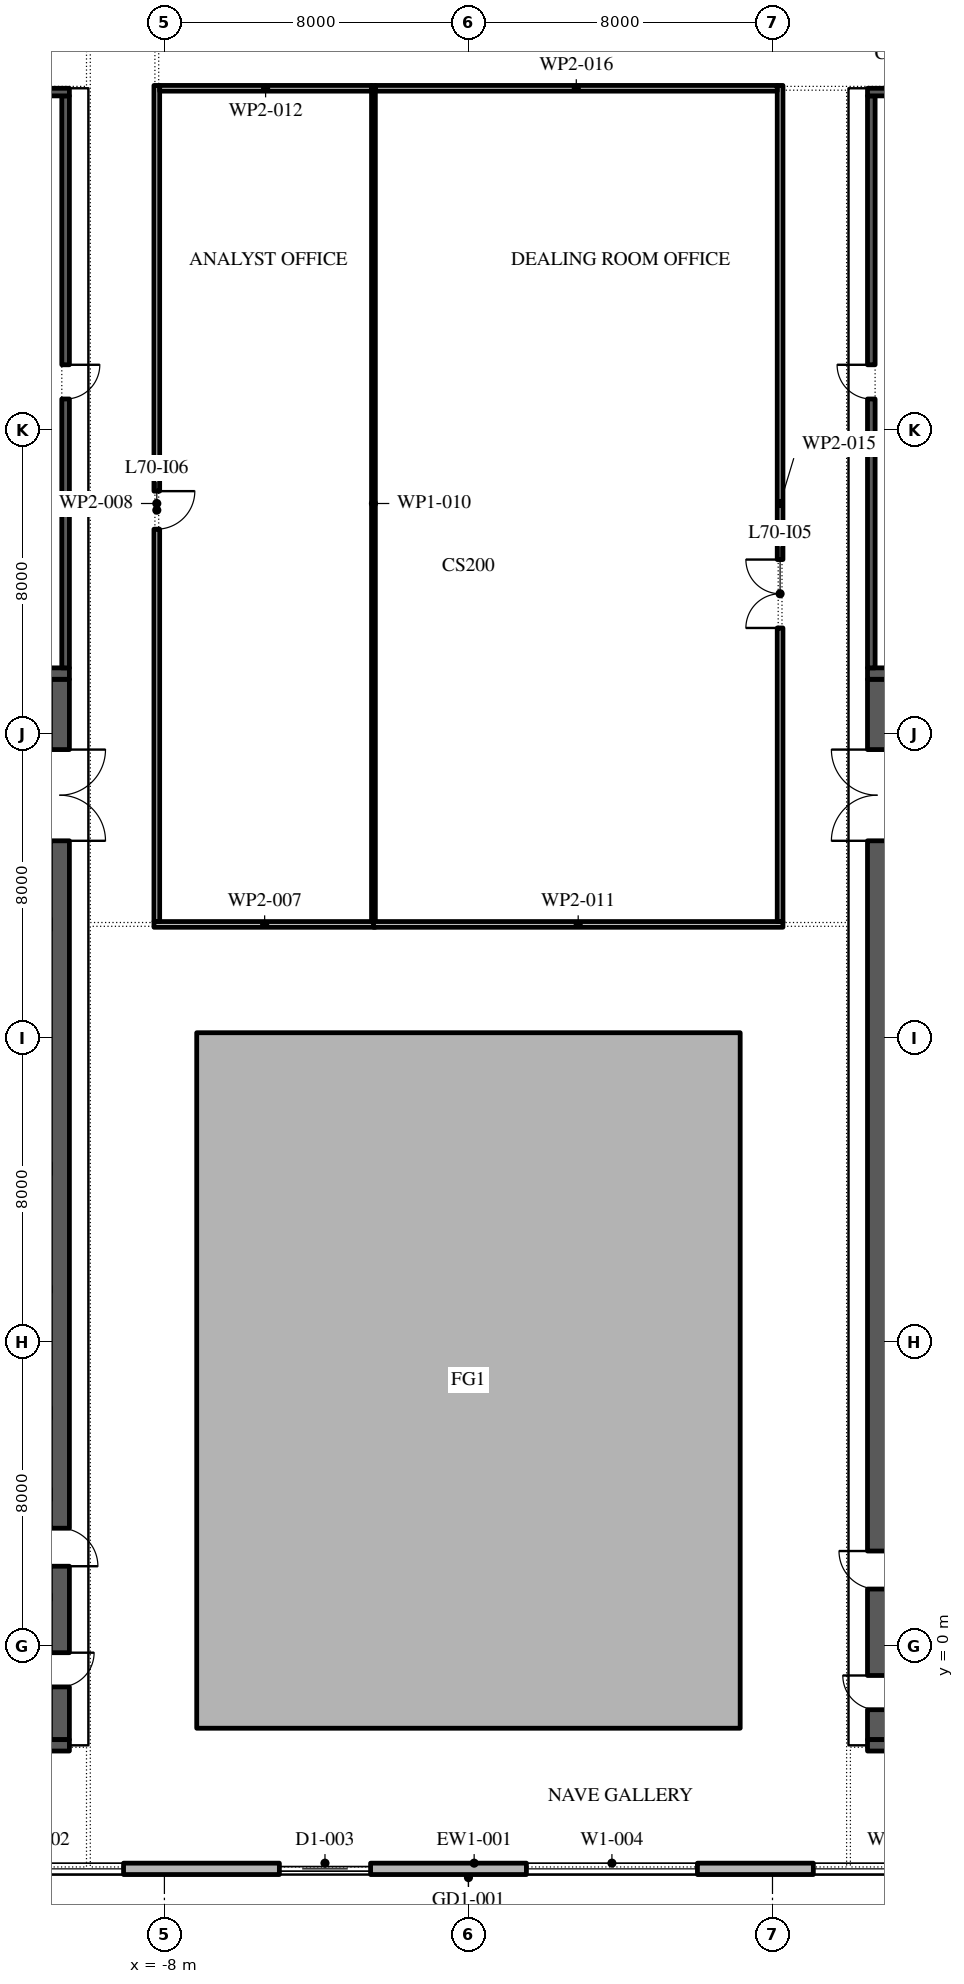
"""IFC4 building model, lengths in metres.
Left out: names, types, materials, properties, quantities, classifications, styles, units other than length and angle.
Written with IfcOpenShell. Run it as: python <this file> out.ifc"""

import sys

from ifc_helpers import new_model, si_unit, direction, frame, frame_2d, origin, place, context, subcontext, project, spatial, polyline, rectangle, outline, extrude, element, fill, save


model = new_model("IFC4")
c1 = context("Model", 3, precision=1e-05, world=origin(), true_north=direction((0.0, 1.0)))
c2 = subcontext(c1, "Body", "Model", "MODEL_VIEW")
j1 = project(units=[si_unit("LENGTHUNIT", "METRE"), si_unit("PLANEANGLEUNIT", "RADIAN")], contexts=[c1])
p1 = place(None, origin())
s1 = spatial("IfcSite", under=j1, at=p1, CompositionType="ELEMENT")
p2 = place(p1, origin())
s2 = spatial("IfcBuilding", under=s1, at=p2, CompositionType="ELEMENT")
p3 = place(p2, frame((0.0, 0.0, 321.6)))
s3 = spatial("IfcBuildingStorey", under=s2, at=p3, CompositionType="ELEMENT", Elevation=321.6)
p4 = place(p3, origin())
e1 = element("IfcWall", 1, at=p4, inside=s3, PredefinedType="STANDARD", context=c2, shape_type="SweptSolid", body=[
    extrude(outline(polyline([(-7.15, -2.15), (7.15, -2.15), (7.15, 16.15), (-7.15, 16.15), (-7.15, -2.15)]), holes=[polyline([(-7.0, -2.0), (-7.0, 16.0), (7.0, 16.0), (7.0, -2.0), (-7.0, -2.0)])]), origin(), (0.0, 0.0, 1.0), 4.0),
])
p5 = place(p3, frame((-22.35, -5.85, 0.0), z_axis=(0.0, 0.0, 1.0), x_axis=(1.0, 0.0, 0.0)))
e2 = element("IfcWall", 2, at=p5, inside=s3, PredefinedType="STANDARD", context=c2, shape_type="SweptSolid", body=[
    extrude(rectangle(XDim=45.0, YDim=0.3, at=frame_2d((22.5, 0.0))), origin(), (0.0, 0.0, 1.0), 4.0),
])
p6 = place(p5, frame((1.375, 0.0, 0.45)))
e3 = element("IfcOpeningElement", 3, at=p6, cuts=e2, PredefinedType="OPENING", context=c2, shape_type="SweptSolid", body=[
    extrude(rectangle(XDim=4.5, YDim=3.05, at=frame_2d((2.25, 1.525))), frame((0.0, 0.16, 0.0), z_axis=(0.0, -1.0, 0.0), x_axis=(1.0, 0.0, 0.0)), (0.0, 0.0, 1.0), 0.32),
])
p7 = place(p5, frame((8.775, 0.0, 0.45)))
e4 = element("IfcOpeningElement", 4, at=p7, cuts=e2, PredefinedType="OPENING", context=c2, shape_type="SweptSolid", body=[
    extrude(rectangle(XDim=4.5, YDim=3.05, at=frame_2d((2.25, 1.525))), frame((0.0, 0.16, 0.0), z_axis=(0.0, -1.0, 0.0), x_axis=(1.0, 0.0, 0.0)), (0.0, 0.0, 1.0), 0.32),
])
p8 = place(p5, frame((17.375, 0.0, 0.0)))
e5 = element("IfcOpeningElement", 5, at=p8, cuts=e2, PredefinedType="OPENING", context=c2, shape_type="SweptSolid", body=[
    extrude(rectangle(XDim=2.4, YDim=3.5, at=frame_2d((1.2, 1.75))), frame((0.0, 0.16, 0.0), z_axis=(0.0, -1.0, 0.0), x_axis=(1.0, 0.0, 0.0)), (0.0, 0.0, 1.0), 0.32),
])
p9 = place(p5, frame((23.875, 0.0, 0.45)))
e6 = element("IfcOpeningElement", 6, at=p9, cuts=e2, PredefinedType="OPENING", context=c2, shape_type="SweptSolid", body=[
    extrude(rectangle(XDim=4.5, YDim=3.05, at=frame_2d((2.25, 1.525))), frame((0.0, 0.16, 0.0), z_axis=(0.0, -1.0, 0.0), x_axis=(1.0, 0.0, 0.0)), (0.0, 0.0, 1.0), 0.32),
])
p10 = place(p5, frame((31.425, 0.0, 0.45)))
e7 = element("IfcOpeningElement", 7, at=p10, cuts=e2, PredefinedType="OPENING", context=c2, shape_type="SweptSolid", body=[
    extrude(rectangle(XDim=4.5, YDim=3.05, at=frame_2d((2.25, 1.525))), frame((0.0, 0.16, 0.0), z_axis=(0.0, -1.0, 0.0), x_axis=(1.0, 0.0, 0.0)), (0.0, 0.0, 1.0), 0.32),
])
p11 = place(p5, frame((38.975, 0.0, 0.45)))
e8 = element("IfcOpeningElement", 8, at=p11, cuts=e2, PredefinedType="OPENING", context=c2, shape_type="SweptSolid", body=[
    extrude(rectangle(XDim=4.5, YDim=3.05, at=frame_2d((2.25, 1.525))), frame((0.0, 0.16, 0.0), z_axis=(0.0, -1.0, 0.0), x_axis=(1.0, 0.0, 0.0)), (0.0, 0.0, 1.0), 0.32),
])
p12 = place(p3, frame((-10.75, -2.45, 0.0), z_axis=(0.0, 0.0, 1.0), x_axis=(0.0, 1.0, 0.0)))
e9 = element("IfcWall", 9, at=p12, inside=s3, PredefinedType="SHEAR", context=c2, shape_type="SweptSolid", body=[
    extrude(rectangle(XDim=27.9, YDim=0.5, at=frame_2d((13.95, 0.0))), origin(), (0.0, 0.0, 1.0), 4.0),
])
p13 = place(p12, frame((23.65, 0.0, 0.0)))
e10 = element("IfcOpeningElement", 10, at=p13, cuts=e9, PredefinedType="OPENING", context=c2, shape_type="SweptSolid", body=[
    extrude(rectangle(XDim=2.4, YDim=2.1, at=frame_2d((1.2, 1.05))), frame((0.0, 0.26, 0.0), z_axis=(0.0, -1.0, 0.0), x_axis=(1.0, 0.0, 0.0)), (0.0, 0.0, 1.0), 0.52),
])
p14 = place(p12, frame((1.387, 0.0, 0.0)))
e11 = element("IfcOpeningElement", 11, at=p14, cuts=e9, PredefinedType="OPENING", context=c2, shape_type="SweptSolid", body=[
    extrude(rectangle(XDim=0.9, YDim=2.1, at=frame_2d((0.45, 1.05))), frame((0.0, 0.26, 0.0), z_axis=(0.0, -1.0, 0.0), x_axis=(1.0, 0.0, 0.0)), (0.0, 0.0, 1.0), 0.52),
])
p15 = place(p12, frame((4.562, 0.0, 0.0)))
e12 = element("IfcOpeningElement", 12, at=p15, cuts=e9, PredefinedType="OPENING", context=c2, shape_type="SweptSolid", body=[
    extrude(rectangle(XDim=1.0, YDim=2.1, at=frame_2d((0.5, 1.05))), frame((0.0, 0.26, 0.0), z_axis=(0.0, -1.0, 0.0), x_axis=(1.0, 0.0, 0.0)), (0.0, 0.0, 1.0), 0.52),
])
for number, where, z_axis, x_axis in (
    (13, (-21.5, -2.6, 0.0), (0.0, 0.0, 1.0), (1.0, 0.0, 0.0)),
    (14, (-21.5, 25.6, 0.0), (0.0, 0.0, 1.0), (1.0, 0.0, 0.0)),
):
    element("IfcWall", number, at=place(p3, frame(where, z_axis=z_axis, x_axis=x_axis)), inside=s3, PredefinedType="SHEAR", context=c2, shape_type="SweptSolid", body=[
        extrude(rectangle(XDim=11.0, YDim=0.3, at=frame_2d((5.5, 0.0))), origin(), (0.0, 0.0, 1.0), 4.0),
    ])
p16 = place(p3, frame((-10.6, 25.75, 0.0), z_axis=(0.0, 0.0, 1.0), x_axis=(0.0, 1.0, 0.0)))
e15 = element("IfcWall", 15, at=p16, inside=s3, PredefinedType="SHEAR", context=c2, shape_type="SweptSolid", body=[
    extrude(rectangle(XDim=15.05, YDim=0.2, at=frame_2d((7.525, 0.0))), origin(), (0.0, 0.0, 1.0), 4.0),
])
p17 = place(p16, frame((7.075, 0.0, 0.0)))
e16 = element("IfcOpeningElement", 16, at=p17, cuts=e15, PredefinedType="OPENING", context=c2, shape_type="SweptSolid", body=[
    extrude(rectangle(XDim=0.9, YDim=2.1, at=frame_2d((0.45, 1.05))), frame((0.0, 0.11, 0.0), z_axis=(0.0, -1.0, 0.0), x_axis=(1.0, 0.0, 0.0)), (0.0, 0.0, 1.0), 0.22),
])
p18 = place(p3, frame((-21.5, 40.9, 0.0), z_axis=(0.0, 0.0, 1.0), x_axis=(1.0, 0.0, 0.0)))
e17 = element("IfcWall", 17, at=p18, inside=s3, PredefinedType="SHEAR", context=c2, shape_type="SweptSolid", body=[
    extrude(rectangle(XDim=11.0, YDim=0.2, at=frame_2d((5.5, 0.0))), origin(), (0.0, 0.0, 1.0), 4.0),
])
p19 = place(p3, frame((10.75, -2.45, 0.0), z_axis=(0.0, 0.0, 1.0), x_axis=(0.0, 1.0, 0.0)))
e18 = element("IfcWall", 18, at=p19, inside=s3, PredefinedType="SHEAR", context=c2, shape_type="SweptSolid", body=[
    extrude(rectangle(XDim=27.9, YDim=0.5, at=frame_2d((13.95, 0.0))), origin(), (0.0, 0.0, 1.0), 4.0),
])
p20 = place(p19, frame((23.65, 0.0, 0.0)))
e19 = element("IfcOpeningElement", 19, at=p20, cuts=e18, PredefinedType="OPENING", context=c2, shape_type="SweptSolid", body=[
    extrude(rectangle(XDim=2.4, YDim=2.1, at=frame_2d((1.2, 1.05))), frame((0.0, 0.26, 0.0), z_axis=(0.0, -1.0, 0.0), x_axis=(1.0, 0.0, 0.0)), (0.0, 0.0, 1.0), 0.52),
])
p21 = place(p19, frame((0.788, 0.0, 0.0)))
e20 = element("IfcOpeningElement", 20, at=p21, cuts=e18, PredefinedType="OPENING", context=c2, shape_type="SweptSolid", body=[
    extrude(rectangle(XDim=0.9, YDim=2.1, at=frame_2d((0.45, 1.05))), frame((0.0, 0.26, 0.0), z_axis=(0.0, -1.0, 0.0), x_axis=(1.0, 0.0, 0.0)), (0.0, 0.0, 1.0), 0.52),
])
p22 = place(p19, frame((3.962, 0.0, 0.0)))
e21 = element("IfcOpeningElement", 21, at=p22, cuts=e18, PredefinedType="OPENING", context=c2, shape_type="SweptSolid", body=[
    extrude(rectangle(XDim=1.0, YDim=2.1, at=frame_2d((0.5, 1.05))), frame((0.0, 0.26, 0.0), z_axis=(0.0, -1.0, 0.0), x_axis=(1.0, 0.0, 0.0)), (0.0, 0.0, 1.0), 0.52),
])
for number, where, z_axis, x_axis in (
    (22, (10.5, -2.6, 0.0), (0.0, 0.0, 1.0), (1.0, 0.0, 0.0)),
    (23, (10.5, 25.6, 0.0), (0.0, 0.0, 1.0), (1.0, 0.0, 0.0)),
):
    element("IfcWall", number, at=place(p3, frame(where, z_axis=z_axis, x_axis=x_axis)), inside=s3, PredefinedType="SHEAR", context=c2, shape_type="SweptSolid", body=[
        extrude(rectangle(XDim=11.0, YDim=0.3, at=frame_2d((5.5, 0.0))), origin(), (0.0, 0.0, 1.0), 4.0),
    ])
p23 = place(p3, frame((10.6, 25.75, 0.0), z_axis=(0.0, 0.0, 1.0), x_axis=(0.0, 1.0, 0.0)))
e24 = element("IfcWall", 24, at=p23, inside=s3, PredefinedType="SHEAR", context=c2, shape_type="SweptSolid", body=[
    extrude(rectangle(XDim=15.05, YDim=0.2, at=frame_2d((7.525, 0.0))), origin(), (0.0, 0.0, 1.0), 4.0),
])
p24 = place(p23, frame((7.075, 0.0, 0.0)))
e25 = element("IfcOpeningElement", 25, at=p24, cuts=e24, PredefinedType="OPENING", context=c2, shape_type="SweptSolid", body=[
    extrude(rectangle(XDim=0.9, YDim=2.1, at=frame_2d((0.45, 1.05))), frame((0.0, 0.11, 0.0), z_axis=(0.0, -1.0, 0.0), x_axis=(1.0, 0.0, 0.0)), (0.0, 0.0, 1.0), 0.22),
])
p25 = place(p3, frame((10.5, 40.9, 0.0), z_axis=(0.0, 0.0, 1.0), x_axis=(1.0, 0.0, 0.0)))
e26 = element("IfcWall", 26, at=p25, inside=s3, PredefinedType="SHEAR", context=c2, shape_type="SweptSolid", body=[
    extrude(rectangle(XDim=11.0, YDim=0.2, at=frame_2d((5.5, 0.0))), origin(), (0.0, 0.0, 1.0), 4.0),
])
p26 = place(p3, frame((-8.275, 19.0, 0.0), z_axis=(0.0, 0.0, 1.0), x_axis=(1.0, 0.0, 0.0)))
e27 = element("IfcWall", 27, at=p26, inside=s3, PredefinedType="PARTITIONING", context=c2, shape_type="SweptSolid", body=[
    extrude(rectangle(XDim=5.825, YDim=0.15, at=frame_2d((2.913, 0.0))), origin(), (0.0, 0.0, 1.0), 4.0),
])
p27 = place(p3, frame((-8.2, 41.075, 0.0), z_axis=(0.0, 0.0, 1.0), x_axis=(0.0, -1.0, 0.0)))
e28 = element("IfcWall", 28, at=p27, inside=s3, PredefinedType="PARTITIONING", context=c2, shape_type="SweptSolid", body=[
    extrude(rectangle(XDim=22.0, YDim=0.15, at=frame_2d((11.0, 0.0))), origin(), (0.0, 0.0, 1.0), 4.0),
])
p28 = place(p27, frame((10.675, 0.0, 0.0)))
e29 = element("IfcOpeningElement", 29, at=p28, cuts=e28, PredefinedType="OPENING", context=c2, shape_type="SweptSolid", body=[
    extrude(rectangle(XDim=1.0, YDim=2.1, at=frame_2d((0.5, 1.05))), frame((0.0, 0.085, 0.0), z_axis=(0.0, -1.0, 0.0), x_axis=(1.0, 0.0, 0.0)), (0.0, 0.0, 1.0), 0.17),
])
p29 = place(p3, frame((-2.5, 19.075, 0.0), z_axis=(0.0, 0.0, 1.0), x_axis=(0.0, 1.0, 0.0)))
e30 = element("IfcWall", 30, at=p29, inside=s3, PredefinedType="PARTITIONING", context=c2, shape_type="SweptSolid", body=[
    extrude(rectangle(XDim=22.0, YDim=0.1, at=frame_2d((11.0, 0.0))), origin(), (0.0, 0.0, 1.0), 4.0),
])
p30 = place(p3, frame((-2.5, 19.0, 0.0), z_axis=(0.0, 0.0, 1.0), x_axis=(1.0, 0.0, 0.0)))
e31 = element("IfcWall", 31, at=p30, inside=s3, PredefinedType="PARTITIONING", context=c2, shape_type="SweptSolid", body=[
    extrude(rectangle(XDim=10.775, YDim=0.15, at=frame_2d((5.387, 0.0))), origin(), (0.0, 0.0, 1.0), 4.0),
])
p31 = place(p3, frame((-2.55, 41.0, 0.0), z_axis=(0.0, 0.0, 1.0), x_axis=(-1.0, 0.0, 0.0)))
e32 = element("IfcWall", 32, at=p31, inside=s3, PredefinedType="PARTITIONING", context=c2, shape_type="SweptSolid", body=[
    extrude(rectangle(XDim=5.575, YDim=0.15, at=frame_2d((2.788, 0.0))), origin(), (0.0, 0.0, 1.0), 4.0),
])
p32 = place(p3, frame((8.2, 19.075, 0.0), z_axis=(0.0, 0.0, 1.0), x_axis=(0.0, 1.0, 0.0)))
e33 = element("IfcWall", 33, at=p32, inside=s3, PredefinedType="PARTITIONING", context=c2, shape_type="SweptSolid", body=[
    extrude(rectangle(XDim=22.0, YDim=0.15, at=frame_2d((11.0, 0.0))), origin(), (0.0, 0.0, 1.0), 4.0),
])
p33 = place(p32, frame((7.725, 0.0, 0.0)))
e34 = element("IfcOpeningElement", 34, at=p33, cuts=e33, PredefinedType="OPENING", context=c2, shape_type="SweptSolid", body=[
    extrude(rectangle(XDim=1.8, YDim=2.1, at=frame_2d((0.9, 1.05))), frame((0.0, 0.085, 0.0), z_axis=(0.0, -1.0, 0.0), x_axis=(1.0, 0.0, 0.0)), (0.0, 0.0, 1.0), 0.17),
])
p34 = place(p3, frame((8.125, 41.0, 0.0), z_axis=(0.0, 0.0, 1.0), x_axis=(-1.0, 0.0, 0.0)))
e35 = element("IfcWall", 35, at=p34, inside=s3, PredefinedType="PARTITIONING", context=c2, shape_type="SweptSolid", body=[
    extrude(rectangle(XDim=10.575, YDim=0.15, at=frame_2d((5.288, 0.0))), origin(), (0.0, 0.0, 1.0), 4.0),
])
p35 = place(p7, origin())
e36 = element("IfcWindow", 36, at=p35, inside=s3, PartitioningType="DOUBLE_PANEL_VERTICAL", PredefinedType="WINDOW", context=c2, shape_type="SweptSolid", body=[
    extrude(rectangle(XDim=4.5, YDim=3.05, at=frame_2d((2.25, 1.525))), frame((0.0, 0.03, 0.0), z_axis=(0.0, -1.0, 0.0), x_axis=(1.0, 0.0, 0.0)), (0.0, 0.0, 1.0), 0.06),
])
fill(e4, e36)
p36 = place(p8, origin())
e37 = element("IfcDoor", 37, at=p36, inside=s3, OperationType="DOUBLE_DOOR_SLIDING", PredefinedType="DOOR", context=c2, shape_type="SweptSolid", body=[
    extrude(rectangle(XDim=2.4, YDim=3.5, at=frame_2d((1.2, 1.75))), frame((0.0, 0.025, 0.0), z_axis=(0.0, -1.0, 0.0), x_axis=(1.0, 0.0, 0.0)), (0.0, 0.0, 1.0), 0.05),
])
fill(e5, e37)
p37 = place(p9, origin())
e38 = element("IfcWindow", 38, at=p37, inside=s3, PartitioningType="DOUBLE_PANEL_VERTICAL", PredefinedType="WINDOW", context=c2, shape_type="SweptSolid", body=[
    extrude(rectangle(XDim=4.5, YDim=3.05, at=frame_2d((2.25, 1.525))), frame((0.0, 0.03, 0.0), z_axis=(0.0, -1.0, 0.0), x_axis=(1.0, 0.0, 0.0)), (0.0, 0.0, 1.0), 0.06),
])
fill(e6, e38)
p38 = place(p10, origin())
e39 = element("IfcWindow", 39, at=p38, inside=s3, PartitioningType="DOUBLE_PANEL_VERTICAL", PredefinedType="WINDOW", context=c2, shape_type="SweptSolid", body=[
    extrude(rectangle(XDim=4.5, YDim=3.05, at=frame_2d((2.25, 1.525))), frame((0.0, 0.03, 0.0), z_axis=(0.0, -1.0, 0.0), x_axis=(1.0, 0.0, 0.0)), (0.0, 0.0, 1.0), 0.06),
])
fill(e7, e39)
p39 = place(p13, frame((2.4, 0.0, 0.0), z_axis=(0.0, 0.0, 1.0), x_axis=(-1.0, 0.0, 0.0)))
e40 = element("IfcDoor", 40, at=p39, inside=s3, OperationType="DOUBLE_DOOR_SINGLE_SWING", PredefinedType="DOOR", context=c2, shape_type="SweptSolid", body=[
    extrude(rectangle(XDim=2.4, YDim=2.1, at=frame_2d((1.2, 1.05))), frame((0.0, 0.025, 0.0), z_axis=(0.0, -1.0, 0.0), x_axis=(1.0, 0.0, 0.0)), (0.0, 0.0, 1.0), 0.05),
])
fill(e10, e40)
p40 = place(p17, frame((0.9, 0.15, 0.0), z_axis=(0.0, 0.0, 1.0), x_axis=(-1.0, 0.0, 0.0)))
e41 = element("IfcDoor", 41, at=p40, inside=s3, OperationType="SINGLE_SWING_RIGHT", PredefinedType="DOOR", context=c2, shape_type="SweptSolid", body=[
    extrude(rectangle(XDim=0.9, YDim=2.1, at=frame_2d((0.45, 1.05))), frame((0.0, 0.1, 0.0), z_axis=(0.0, -1.0, 0.0), x_axis=(1.0, 0.0, 0.0)), (0.0, 0.0, 1.0), 0.05),
])
fill(e16, e41)
p41 = place(p20, origin())
e42 = element("IfcDoor", 42, at=p41, inside=s3, OperationType="DOUBLE_DOOR_SINGLE_SWING", PredefinedType="DOOR", context=c2, shape_type="SweptSolid", body=[
    extrude(rectangle(XDim=2.4, YDim=2.1, at=frame_2d((1.2, 1.05))), frame((0.0, 0.025, 0.0), z_axis=(0.0, -1.0, 0.0), x_axis=(1.0, 0.0, 0.0)), (0.0, 0.0, 1.0), 0.05),
])
fill(e19, e42)
p42 = place(p24, origin())
e43 = element("IfcDoor", 43, at=p42, inside=s3, OperationType="SINGLE_SWING_LEFT", PredefinedType="DOOR", context=c2, shape_type="SweptSolid", body=[
    extrude(rectangle(XDim=0.9, YDim=2.1, at=frame_2d((0.45, 1.05))), frame((0.0, -0.05, 0.0), z_axis=(0.0, -1.0, 0.0), x_axis=(1.0, 0.0, 0.0)), (0.0, 0.0, 1.0), 0.05),
])
fill(e25, e43)
p43 = place(p33, origin())
e44 = element("IfcDoor", 44, at=p43, inside=s3, OperationType="SINGLE_SWING_RIGHT", PredefinedType="DOOR", context=c2, shape_type="SweptSolid", body=[
    extrude(rectangle(XDim=1.8, YDim=2.1, at=frame_2d((0.9, 1.05))), frame((0.0, 0.025, 0.0), z_axis=(0.0, -1.0, 0.0), x_axis=(1.0, 0.0, 0.0)), (0.0, 0.0, 1.0), 0.05),
])
fill(e34, e44)
p44 = place(p28, origin())
e45 = element("IfcDoor", 45, at=p44, inside=s3, OperationType="SINGLE_SWING_RIGHT", PredefinedType="DOOR", context=c2, shape_type="SweptSolid", body=[
    extrude(rectangle(XDim=1.0, YDim=2.1, at=frame_2d((0.5, 1.05))), frame((0.0, 0.025, 0.0), z_axis=(0.0, -1.0, 0.0), x_axis=(1.0, 0.0, 0.0)), (0.0, 0.0, 1.0), 0.05),
])
fill(e29, e45)
save(model, sys.argv[1])
